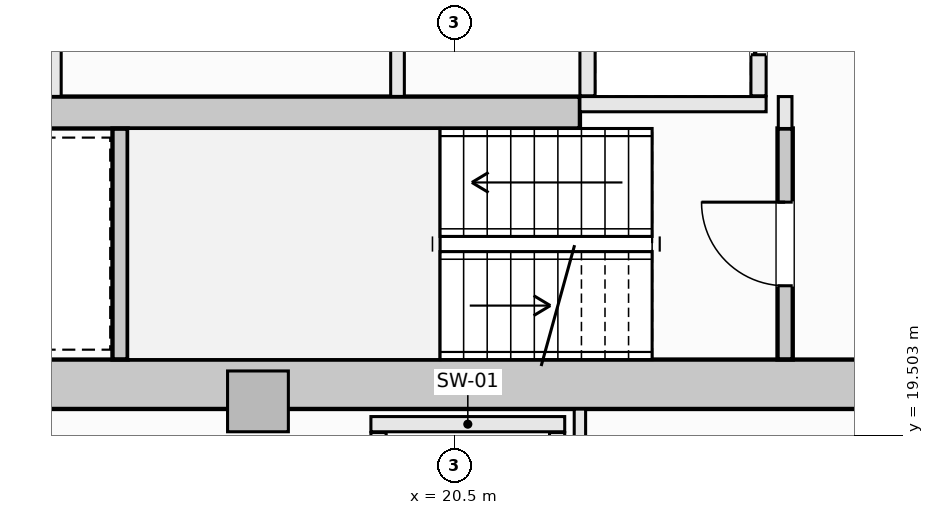
"""IFC4 building model, lengths in metres.
Left out: names, types, materials, properties, quantities, classifications, styles, units other than length and angle.
Written with IfcOpenShell. Run it as: python <this file> out.ifc"""

import sys

from ifc_helpers import new_model, si_unit, direction, frame, frame_2d, origin, origin_2d, place, context, subcontext, project, spatial, rectangle, extrude, element, fill, save


model = new_model("IFC4")
c1 = context("Model", 3, precision=1e-05, world=origin(), true_north=direction((0.0, 1.0)))
c2 = subcontext(c1, "Body", "Model", "MODEL_VIEW")
j1 = project(units=[si_unit("LENGTHUNIT", "METRE"), si_unit("PLANEANGLEUNIT", "RADIAN")], contexts=[c1])
p1 = place(None, origin())
s1 = spatial("IfcSite", under=j1, at=p1, CompositionType="ELEMENT")
p2 = place(p1, origin())
s2 = spatial("IfcBuilding", under=s1, at=p2, CompositionType="ELEMENT")
p3 = place(p2, frame((0.0, 0.0, 129.1)))
s3 = spatial("IfcBuildingStorey", under=s2, at=p3, CompositionType="ELEMENT", Elevation=129.1)
p4 = place(p3, frame((14.175, 20.175, -0.27), z_axis=(0.0, 0.0, 1.0), x_axis=(1.0, 0.0, 0.0)))
e1 = element("IfcWall", 1, at=p4, inside=s3, PredefinedType="SHEAR", context=c2, shape_type="SweptSolid", body=[
    extrude(rectangle(XDim=13.65, YDim=0.65, at=frame_2d((6.825, 0.0))), origin(), (0.0, 0.0, 1.0), 3.4),
])
p5 = place(p3, frame((14.85, 23.75, -0.27), z_axis=(0.0, 0.0, 1.0), x_axis=(1.0, 0.0, 0.0)))
e2 = element("IfcWall", 2, at=p5, inside=s3, PredefinedType="SHEAR", context=c2, shape_type="SweptSolid", body=[
    extrude(rectangle(XDim=7.3, YDim=0.42, at=frame_2d((3.65, 0.0))), origin(), (0.0, 0.0, 1.0), 3.4),
])
p6 = place(p3, frame((17.914, 19.95, -0.27), z_axis=(0.0, 0.0, 1.0), x_axis=(1.0, 0.0, 0.0)))
e3 = element("IfcColumn", 3, at=p6, inside=s3, PredefinedType="PILASTER", context=c2, shape_type="SweptSolid", body=[
    extrude(rectangle(XDim=0.8, YDim=0.8, at=origin_2d()), origin(), (0.0, 0.0, 1.0), 3.4),
])
p7 = place(p3, frame((24.85, 20.502, -0.27), z_axis=(0.0, 0.0, 1.0), x_axis=(0.0, 1.0, 0.0)))
e4 = element("IfcWall", 4, at=p7, inside=s3, PredefinedType="SHEAR", context=c2, shape_type="SweptSolid", body=[
    extrude(rectangle(XDim=3.038, YDim=0.2, at=frame_2d((1.519, 0.0))), origin(), (0.0, 0.0, 1.0), 3.4),
])
p8 = place(p7, frame((0.969, 0.0, 0.27)))
e5 = element("IfcOpeningElement", 5, at=p8, cuts=e4, PredefinedType="OPENING", context=c2, shape_type="SweptSolid", body=[
    extrude(rectangle(XDim=1.1, YDim=2.15, at=frame_2d((0.55, 1.075))), frame((0.0, 0.11, 0.0), z_axis=(0.0, -1.0, 0.0), x_axis=(1.0, 0.0, 0.0)), (0.0, 0.0, 1.0), 0.22),
])
p9 = place(p3, frame((16.1, 20.502, -0.27), z_axis=(0.0, 0.0, 1.0), x_axis=(0.0, 1.0, 0.0)))
e6 = element("IfcWall", 6, at=p9, inside=s3, PredefinedType="SHEAR", context=c2, shape_type="SweptSolid", body=[
    extrude(rectangle(XDim=3.036, YDim=0.2, at=frame_2d((1.518, 0.0))), origin(), (0.0, 0.0, 1.0), 3.4),
])
p10 = place(p3, frame((22.15, 23.86, 0.0), z_axis=(0.0, 0.0, 1.0), x_axis=(1.0, 0.0, 0.0)))
e7 = element("IfcWall", 7, at=p10, inside=s3, PredefinedType="SOLIDWALL", context=c2, shape_type="SweptSolid", body=[
    extrude(rectangle(XDim=2.45, YDim=0.2, at=frame_2d((1.225, 0.0))), origin(), (0.0, 0.0, 1.0), 3.13),
])
p11 = place(p3, frame((22.25, 23.97, 0.0), z_axis=(0.0, 0.0, 1.0), x_axis=(0.0, 1.0, 0.0)))
e8 = element("IfcWall", 8, at=p11, inside=s3, PredefinedType="SOLIDWALL", context=c2, shape_type="SweptSolid", body=[
    extrude(rectangle(XDim=2.18, YDim=0.2, at=frame_2d((1.09, 0.0))), origin(), (0.0, 0.0, 1.0), 3.13),
])
p12 = place(p3, frame((24.5, 23.97, 0.0), z_axis=(0.0, 0.0, 1.0), x_axis=(0.0, 1.0, 0.0)))
e9 = element("IfcWall", 9, at=p12, inside=s3, PredefinedType="SOLIDWALL", context=c2, shape_type="SweptSolid", body=[
    extrude(rectangle(XDim=2.18, YDim=0.2, at=frame_2d((1.09, 0.0))), origin(), (0.0, 0.0, 1.0), 3.13),
])
p13 = place(p12, frame((0.54, 0.0, 0.0)))
e10 = element("IfcOpeningElement", 10, at=p13, cuts=e9, PredefinedType="OPENING", context=c2, shape_type="SweptSolid", body=[
    extrude(rectangle(XDim=1.1, YDim=2.2, at=frame_2d((0.55, 1.1))), frame((0.0, 0.11, 0.0), z_axis=(0.0, -1.0, 0.0), x_axis=(1.0, 0.0, 0.0)), (0.0, 0.0, 1.0), 0.22),
])
p14 = place(p3, frame((19.4, 19.65, 0.0), z_axis=(0.0, 0.0, 1.0), x_axis=(1.0, 0.0, 0.0)))
e11 = element("IfcWall", 11, at=p14, inside=s3, PredefinedType="SOLIDWALL", context=c2, shape_type="SweptSolid", body=[
    extrude(rectangle(XDim=2.55, YDim=0.2, at=frame_2d((1.275, 0.0))), origin(), (0.0, 0.0, 1.0), 3.13),
])
for number, where, z_axis, x_axis in (
    (12, (19.5, 17.01, 0.0), (0.0, 0.0, 1.0), (0.0, 1.0, 0.0)),
    (13, (21.85, 17.01, 0.0), (0.0, 0.0, 1.0), (0.0, 1.0, 0.0)),
):
    element("IfcWall", number, at=place(p3, frame(where, z_axis=z_axis, x_axis=x_axis)), inside=s3, PredefinedType="SOLIDWALL", context=c2, shape_type="SweptSolid", body=[
        extrude(rectangle(XDim=2.53, YDim=0.2, at=frame_2d((1.265, 0.0))), origin(), (0.0, 0.0, 1.0), 3.13),
    ])
p15 = place(p3, frame((24.85, 23.54, 0.0), z_axis=(0.0, 0.0, 1.0), x_axis=(0.0, 1.0, 0.0)))
e14 = element("IfcWall", 14, at=p15, inside=s3, PredefinedType="SOLIDWALL", context=c2, shape_type="SweptSolid", body=[
    extrude(rectangle(XDim=0.42, YDim=0.18, at=frame_2d((0.21, 0.0))), origin(), (0.0, 0.0, 1.0), 3.13),
])
p16 = place(p3, frame((15.25, 23.962, 0.0), z_axis=(0.0, 0.0, 1.0), x_axis=(0.0, 1.0, 0.0)))
e15 = element("IfcWall", 15, at=p16, inside=s3, PredefinedType="PARTITIONING", context=c2, shape_type="SweptSolid", body=[
    extrude(rectangle(XDim=2.106, YDim=0.15, at=frame_2d((1.053, 0.0))), origin(), (0.0, 0.0, 1.0), 3.13),
])
p17 = place(p3, frame((19.75, 23.962, 0.0), z_axis=(0.0, 0.0, 1.0), x_axis=(0.0, 1.0, 0.0)))
e16 = element("IfcWall", 16, at=p17, inside=s3, PredefinedType="SOLIDWALL", context=c2, shape_type="SweptSolid", body=[
    extrude(rectangle(XDim=2.106, YDim=0.18, at=frame_2d((1.053, 0.0))), origin(), (0.0, 0.0, 1.0), 3.13),
])
p18 = place(p3, frame((22.15, 17.127, 0.0), z_axis=(0.0, 0.0, 1.0), x_axis=(0.0, 1.0, 0.0)))
e17 = element("IfcWall", 17, at=p18, inside=s3, PredefinedType="PARTITIONING", context=c2, shape_type="SweptSolid", body=[
    extrude(rectangle(XDim=2.721, YDim=0.15, at=frame_2d((1.36, 0.0))), origin(), (0.0, 0.0, 1.0), 3.13),
])
p19 = place(p8, origin())
e18 = element("IfcDoor", 18, at=p19, inside=s3, OperationType="SINGLE_SWING_RIGHT", PredefinedType="DOOR", context=c2, shape_type="SweptSolid", body=[
    extrude(rectangle(XDim=1.1, YDim=2.15, at=frame_2d((0.55, 1.075))), frame((0.0, 0.025, 0.0), z_axis=(0.0, -1.0, 0.0), x_axis=(1.0, 0.0, 0.0)), (0.0, 0.0, 1.0), 0.05),
])
fill(e5, e18)
p20 = place(p13, origin())
e19 = element("IfcDoor", 19, at=p20, inside=s3, OperationType="SLIDING_TO_LEFT", PredefinedType="DOOR", context=c2, shape_type="SweptSolid", body=[
    extrude(rectangle(XDim=1.1, YDim=2.2, at=frame_2d((0.55, 1.1))), frame((0.0, 0.025, 0.0), z_axis=(0.0, -1.0, 0.0), x_axis=(1.0, 0.0, 0.0)), (0.0, 0.0, 1.0), 0.05),
])
fill(e10, e19)
save(model, sys.argv[1])
